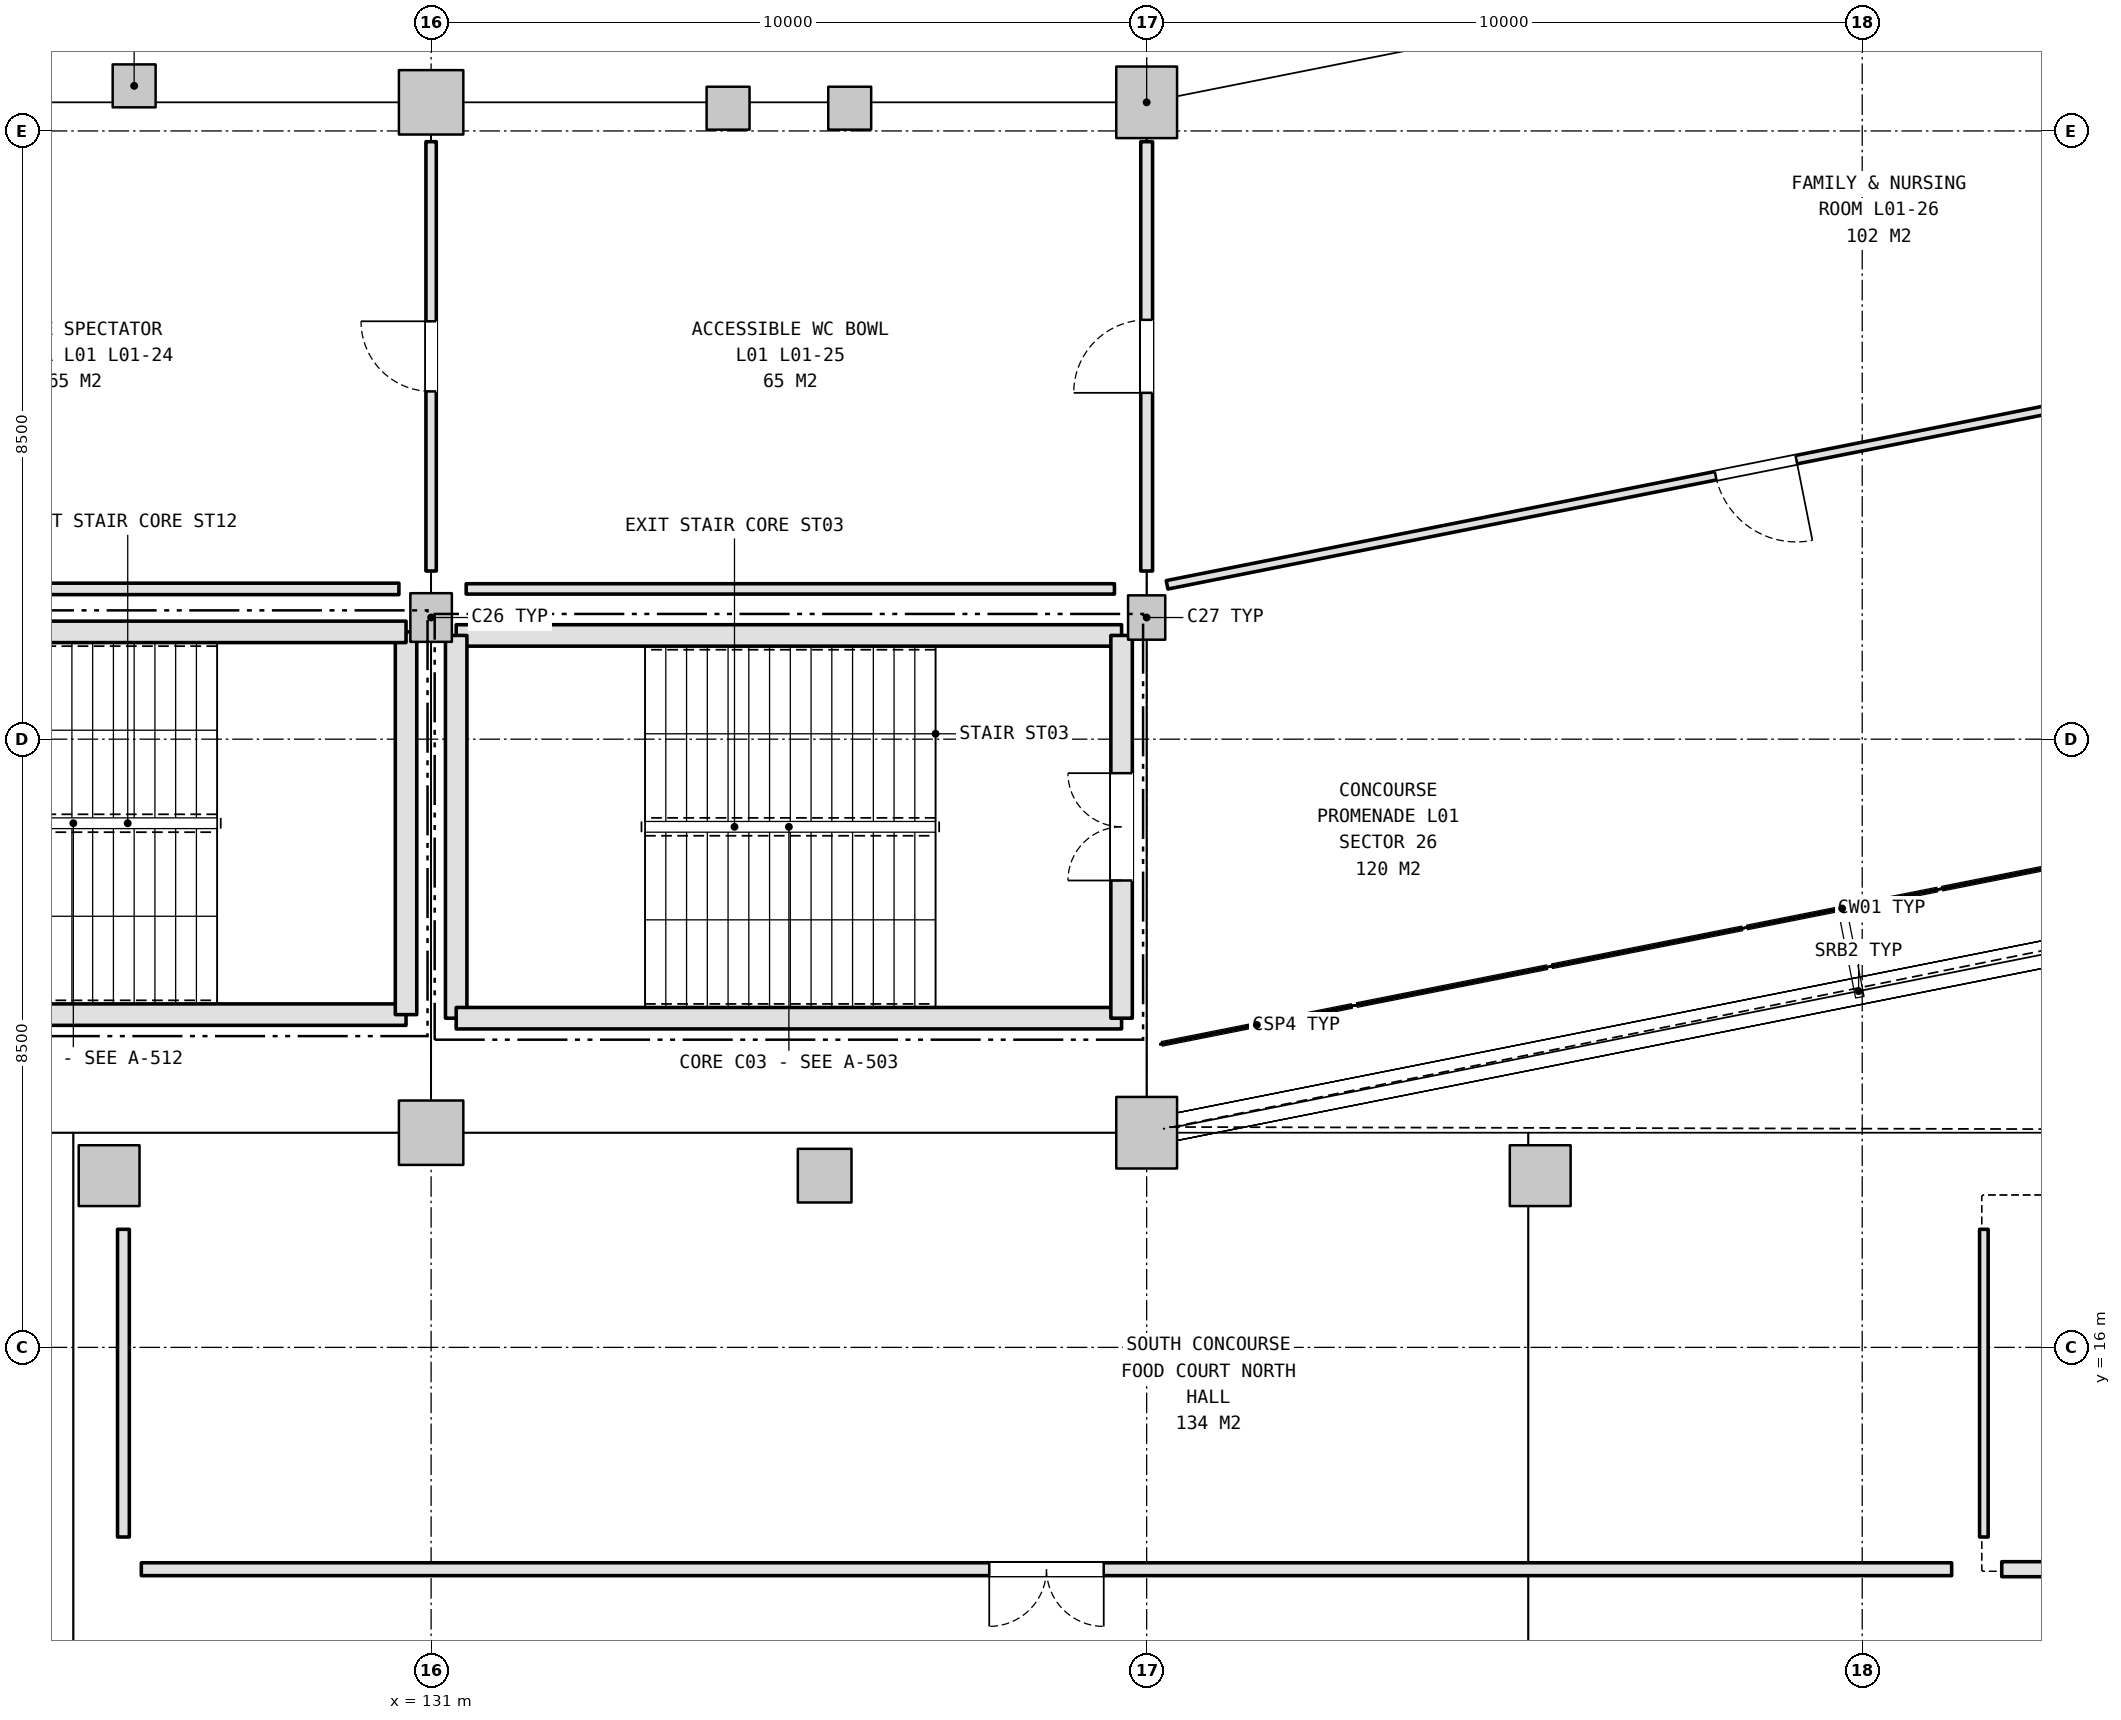
"""IFC4 building model, lengths in metres.
Left out: names, types, materials, properties, quantities, classifications, styles, units other than length and angle.
Written with IfcOpenShell. Run it as: python <this file> out.ifc"""

import sys

from ifc_helpers import new_model, si_unit, direction, frame, frame_2d, origin, origin_2d, place, context, subcontext, project, spatial, rectangle, extrude, element, fill, save


model = new_model("IFC4")
c1 = context("Model", 3, precision=1e-05, world=origin(), true_north=direction((0.0, 1.0)))
c2 = subcontext(c1, "Body", "Model", "MODEL_VIEW")
j1 = project(units=[si_unit("LENGTHUNIT", "METRE"), si_unit("PLANEANGLEUNIT", "RADIAN")], contexts=[c1])
p1 = place(None, origin())
s1 = spatial("IfcSite", under=j1, at=p1, CompositionType="ELEMENT")
p2 = place(p1, origin())
s2 = spatial("IfcBuilding", under=s1, at=p2, CompositionType="ELEMENT")
p3 = place(p2, frame((0.0, 0.0, 5.4)))
s3 = spatial("IfcBuildingStorey", under=s2, at=p3, CompositionType="ELEMENT", Elevation=5.4)
p4 = place(p3, frame((131.0, 33.4, 0.0), z_axis=(0.0, 0.0, 1.0), x_axis=(1.0, 0.0, 0.0)))
e1 = element("IfcColumn", 1, at=p4, inside=s3, PredefinedType="COLUMN", context=c2, shape_type="SweptSolid", body=[
    extrude(rectangle(XDim=0.9, YDim=0.9, at=origin_2d()), origin(), (0.0, 0.0, 1.0), 5.4),
])
p5 = place(p3, frame((131.0, 26.2, 0.0), z_axis=(0.0, 0.0, 1.0), x_axis=(1.0, 0.0, 0.0)))
e2 = element("IfcColumn", 2, at=p5, inside=s3, PredefinedType="COLUMN", context=c2, shape_type="SweptSolid", body=[
    extrude(rectangle(XDim=0.58, YDim=0.68, at=origin_2d()), origin(), (0.0, 0.0, 1.0), 5.4),
])
p6 = place(p3, frame((131.0, 19.0, 0.0), z_axis=(0.0, 0.0, 1.0), x_axis=(1.0, 0.0, 0.0)))
e3 = element("IfcColumn", 3, at=p6, inside=s3, PredefinedType="COLUMN", context=c2, shape_type="SweptSolid", body=[
    extrude(rectangle(XDim=0.9, YDim=0.9, at=origin_2d()), origin(), (0.0, 0.0, 1.0), 5.4),
])
p7 = place(p3, frame((141.0, 33.4, 0.0), z_axis=(0.0, 0.0, 1.0), x_axis=(1.0, 0.0, 0.0)))
e4 = element("IfcColumn", 4, at=p7, inside=s3, PredefinedType="COLUMN", context=c2, shape_type="SweptSolid", body=[
    extrude(rectangle(XDim=0.85, YDim=1.0, at=origin_2d()), origin(), (0.0, 0.0, 1.0), 5.4),
])
p8 = place(p3, frame((141.0, 26.2, 0.0), z_axis=(0.0, 0.0, 1.0), x_axis=(1.0, 0.0, 0.0)))
e5 = element("IfcColumn", 5, at=p8, inside=s3, PredefinedType="COLUMN", context=c2, shape_type="SweptSolid", body=[
    extrude(rectangle(XDim=0.52, YDim=0.62, at=origin_2d()), origin(), (0.0, 0.0, 1.0), 5.4),
])
p9 = place(p3, frame((141.0, 19.0, 0.0), z_axis=(0.0, 0.0, 1.0), x_axis=(1.0, 0.0, 0.0)))
e6 = element("IfcColumn", 6, at=p9, inside=s3, PredefinedType="COLUMN", context=c2, shape_type="SweptSolid", body=[
    extrude(rectangle(XDim=0.85, YDim=1.0, at=origin_2d()), origin(), (0.0, 0.0, 1.0), 5.4),
])
p10 = place(p3, frame((126.5, 18.4, 0.0), z_axis=(0.0, 0.0, 1.0), x_axis=(1.0, 0.0, 0.0)))
e7 = element("IfcColumn", 7, at=p10, inside=s3, PredefinedType="COLUMN", context=c2, shape_type="SweptSolid", body=[
    extrude(rectangle(XDim=0.85, YDim=0.85, at=origin_2d()), origin(), (0.0, 0.0, 1.0), 5.4),
])
p11 = place(p3, frame((136.5, 18.4, 0.0), z_axis=(0.0, 0.0, 1.0), x_axis=(1.0, 0.0, 0.0)))
e8 = element("IfcColumn", 8, at=p11, inside=s3, PredefinedType="COLUMN", context=c2, shape_type="SweptSolid", body=[
    extrude(rectangle(XDim=0.75, YDim=0.75, at=origin_2d()), origin(), (0.0, 0.0, 1.0), 5.4),
])
p12 = place(p3, frame((146.5, 18.4, 0.0), z_axis=(0.0, 0.0, 1.0), x_axis=(1.0, 0.0, 0.0)))
e9 = element("IfcColumn", 9, at=p12, inside=s3, PredefinedType="COLUMN", context=c2, shape_type="SweptSolid", body=[
    extrude(rectangle(XDim=0.85, YDim=0.85, at=origin_2d()), origin(), (0.0, 0.0, 1.0), 5.4),
])
p13 = place(p3, frame((140.65, 25.95, 0.0), z_axis=(0.0, 0.0, 1.0), x_axis=(-1.0, 0.0, 0.0)))
e10 = element("IfcWall", 10, at=p13, inside=s3, PredefinedType="SHEAR", context=c2, shape_type="SweptSolid", body=[
    extrude(rectangle(XDim=9.299, YDim=0.3, at=frame_2d((4.65, 0.0))), origin(), (0.0, 0.0, 1.0), 5.14),
])
p14 = place(p3, frame((131.35, 25.95, 0.0), z_axis=(0.0, 0.0, 1.0), x_axis=(0.0, -1.0, 0.0)))
e11 = element("IfcWall", 11, at=p14, inside=s3, PredefinedType="SHEAR", context=c2, shape_type="SweptSolid", body=[
    extrude(rectangle(XDim=5.349, YDim=0.3, at=frame_2d((2.675, 0.0))), origin(), (0.0, 0.0, 1.0), 5.14),
])
p15 = place(p3, frame((131.35, 20.6, 0.0), z_axis=(0.0, 0.0, 1.0), x_axis=(1.0, 0.0, 0.0)))
e12 = element("IfcWall", 12, at=p15, inside=s3, PredefinedType="SHEAR", context=c2, shape_type="SweptSolid", body=[
    extrude(rectangle(XDim=9.299, YDim=0.3, at=frame_2d((4.65, 0.0))), origin(), (0.0, 0.0, 1.0), 5.14),
])
p16 = place(p3, frame((140.65, 20.6, 0.0), z_axis=(0.0, 0.0, 1.0), x_axis=(0.0, 1.0, 0.0)))
e13 = element("IfcWall", 13, at=p16, inside=s3, PredefinedType="SHEAR", context=c2, shape_type="SweptSolid", body=[
    extrude(rectangle(XDim=5.349, YDim=0.3, at=frame_2d((2.675, 0.0))), origin(), (0.0, 0.0, 1.0), 5.14),
])
p17 = place(p16, frame((1.925, 0.0, 0.0)))
e14 = element("IfcOpeningElement", 14, at=p17, cuts=e13, PredefinedType="OPENING", context=c2, shape_type="SweptSolid", body=[
    extrude(rectangle(XDim=1.5, YDim=2.2, at=frame_2d((0.75, 1.1))), frame((0.0, 0.16, 0.0), z_axis=(0.0, -1.0, 0.0), x_axis=(1.0, 0.0, 0.0)), (0.0, 0.0, 1.0), 0.32),
])
p18 = place(p3, frame((121.35, 20.65, 0.0), z_axis=(0.0, 0.0, 1.0), x_axis=(1.0, 0.0, 0.0)))
e15 = element("IfcWall", 15, at=p18, inside=s3, PredefinedType="SHEAR", context=c2, shape_type="SweptSolid", body=[
    extrude(rectangle(XDim=9.299, YDim=0.3, at=frame_2d((4.65, 0.0))), origin(), (0.0, 0.0, 1.0), 5.14),
])
p19 = place(p3, frame((130.65, 20.65, 0.0), z_axis=(0.0, 0.0, 1.0), x_axis=(0.0, 1.0, 0.0)))
e16 = element("IfcWall", 16, at=p19, inside=s3, PredefinedType="SHEAR", context=c2, shape_type="SweptSolid", body=[
    extrude(rectangle(XDim=5.349, YDim=0.3, at=frame_2d((2.675, 0.0))), origin(), (0.0, 0.0, 1.0), 5.14),
])
p20 = place(p3, frame((130.65, 26.0, 0.0), z_axis=(0.0, 0.0, 1.0), x_axis=(-1.0, 0.0, 0.0)))
e17 = element("IfcWall", 17, at=p20, inside=s3, PredefinedType="SHEAR", context=c2, shape_type="SweptSolid", body=[
    extrude(rectangle(XDim=9.299, YDim=0.3, at=frame_2d((4.65, 0.0))), origin(), (0.0, 0.0, 1.0), 5.14),
])
for number, where, z_axis, x_axis in (
    (18, (126.85, 33.63, 0.0), (0.0, 0.0, 1.0), (1.0, 0.0, 0.0)),
    (19, (136.85, 33.318, 0.0), (0.0, 0.0, 1.0), (1.0, 0.0, 0.0)),
    (20, (135.15, 33.318, 0.0), (0.0, 0.0, 1.0), (1.0, 0.0, 0.0)),
):
    element("IfcColumn", number, at=place(p3, frame(where, z_axis=z_axis, x_axis=x_axis)), inside=s3, PredefinedType="COLUMN", context=c2, shape_type="SweptSolid", body=[
        extrude(rectangle(XDim=0.6, YDim=0.6, at=origin_2d()), origin(), (0.0, 0.0, 1.0), 5.4),
    ])
p21 = place(p3, frame((152.25, 12.9, 0.0), z_axis=(0.0, 0.0, 1.0), x_axis=(-1.0, 0.0, 0.0)))
e21 = element("IfcWall", 21, at=p21, inside=s3, PredefinedType="PARTITIONING", context=c2, shape_type="SweptSolid", body=[
    extrude(rectangle(XDim=25.3, YDim=0.18, at=frame_2d((12.65, 0.0))), origin(), (0.0, 0.0, 1.0), 4.425),
])
p22 = place(p21, frame((11.85, 0.0, 0.0)))
e22 = element("IfcOpeningElement", 22, at=p22, cuts=e21, PredefinedType="OPENING", context=c2, shape_type="SweptSolid", body=[
    extrude(rectangle(XDim=1.6, YDim=2.2, at=frame_2d((0.8, 1.1))), frame((0.0, 0.1, 0.0), z_axis=(0.0, -1.0, 0.0), x_axis=(1.0, 0.0, 0.0)), (0.0, 0.0, 1.0), 0.2),
])
p23 = place(p3, frame((126.7, 13.35, 0.0), z_axis=(0.0, 0.0, 1.0), x_axis=(0.0, 1.0, 0.0)))
e23 = element("IfcWall", 23, at=p23, inside=s3, PredefinedType="PARTITIONING", context=c2, shape_type="SweptSolid", body=[
    extrude(rectangle(XDim=4.3, YDim=0.165, at=frame_2d((2.15, 0.0))), origin(), (0.0, 0.0, 1.0), 4.475),
])
p24 = place(p3, frame((170.25, 12.9, 0.0), z_axis=(0.0, 0.0, 1.0), x_axis=(-1.0, 0.0, 0.0)))
e24 = element("IfcWall", 24, at=p24, inside=s3, PredefinedType="PLUMBINGWALL", context=c2, shape_type="SweptSolid", body=[
    extrude(rectangle(XDim=17.3, YDim=0.21, at=frame_2d((8.65, 0.0))), origin(), (0.0, 0.0, 1.0), 4.425),
])
p25 = place(p24, frame((8.125, 0.0, 0.0)))
e25 = element("IfcOpeningElement", 25, at=p25, cuts=e24, PredefinedType="OPENING", context=c2, shape_type="SweptSolid", body=[
    extrude(rectangle(XDim=1.05, YDim=2.2, at=frame_2d((0.525, 1.1))), frame((0.0, 0.115, 0.0), z_axis=(0.0, -1.0, 0.0), x_axis=(1.0, 0.0, 0.0)), (0.0, 0.0, 1.0), 0.23),
])
p26 = place(p3, frame((152.7, 13.35, 0.0), z_axis=(0.0, 0.0, 1.0), x_axis=(0.0, 1.0, 0.0)))
e26 = element("IfcWall", 26, at=p26, inside=s3, PredefinedType="PARTITIONING", context=c2, shape_type="SweptSolid", body=[
    extrude(rectangle(XDim=4.3, YDim=0.12, at=frame_2d((2.15, 0.0))), origin(), (0.0, 0.0, 1.0), 4.625),
])
p27 = place(p3, frame((131.0, 32.85, 0.0), z_axis=(0.0, 0.0, 1.0), x_axis=(0.0, -1.0, 0.0)))
e27 = element("IfcWall", 27, at=p27, inside=s3, PredefinedType="PARTITIONING", context=c2, shape_type="SweptSolid", body=[
    extrude(rectangle(XDim=6.0, YDim=0.145, at=frame_2d((3.0, 0.0))), origin(), (0.0, 0.0, 1.0), 4.385),
])
p28 = place(p27, frame((2.51, 0.0, 0.0)))
e28 = element("IfcOpeningElement", 28, at=p28, cuts=e27, PredefinedType="OPENING", context=c2, shape_type="SweptSolid", body=[
    extrude(rectangle(XDim=0.98, YDim=2.15, at=frame_2d((0.49, 1.075))), frame((0.0, 0.083, 0.0), z_axis=(0.0, -1.0, 0.0), x_axis=(1.0, 0.0, 0.0)), (0.0, 0.0, 1.0), 0.165),
])
p29 = place(p3, frame((130.55, 26.6, 0.0), z_axis=(0.0, 0.0, 1.0), x_axis=(-1.0, 0.0, 0.0)))
e29 = element("IfcWall", 29, at=p29, inside=s3, PredefinedType="PARTITIONING", context=c2, shape_type="SweptSolid", body=[
    extrude(rectangle(XDim=9.06, YDim=0.16, at=frame_2d((4.53, 0.0))), origin(), (0.0, 0.0, 1.0), 5.12),
])
p30 = place(p3, frame((141.0, 32.85, 0.0), z_axis=(0.0, 0.0, 1.0), x_axis=(0.0, -1.0, 0.0)))
e30 = element("IfcWall", 30, at=p30, inside=s3, PredefinedType="PARTITIONING", context=c2, shape_type="SweptSolid", body=[
    extrude(rectangle(XDim=6.0, YDim=0.165, at=frame_2d((3.0, 0.0))), origin(), (0.0, 0.0, 1.0), 4.305),
])
p31 = place(p30, frame((2.49, 0.0, 0.0)))
e31 = element("IfcOpeningElement", 31, at=p31, cuts=e30, PredefinedType="OPENING", context=c2, shape_type="SweptSolid", body=[
    extrude(rectangle(XDim=1.02, YDim=2.15, at=frame_2d((0.51, 1.075))), frame((0.0, 0.093, 0.0), z_axis=(0.0, -1.0, 0.0), x_axis=(1.0, 0.0, 0.0)), (0.0, 0.0, 1.0), 0.185),
])
p32 = place(p3, frame((140.55, 26.6, 0.0), z_axis=(0.0, 0.0, 1.0), x_axis=(-1.0, 0.0, 0.0)))
e32 = element("IfcWall", 32, at=p32, inside=s3, PredefinedType="PARTITIONING", context=c2, shape_type="SweptSolid", body=[
    extrude(rectangle(XDim=9.06, YDim=0.145, at=frame_2d((4.53, 0.0))), origin(), (0.0, 0.0, 1.0), 5.12),
])
p33 = place(p3, frame((157.746, 29.931, 0.0), z_axis=(0.0, 0.0, 1.0), x_axis=(-0.980786027867, -0.195086564225, 0.0)))
e33 = element("IfcWall", 33, at=p33, inside=s3, PredefinedType="PARTITIONING", context=c2, shape_type="SweptSolid", body=[
    extrude(rectangle(XDim=16.783, YDim=0.12, at=frame_2d((8.392, 0.0))), origin(), (0.0, 0.0, 1.0), 4.305),
])
p34 = place(p33, frame((7.817, 0.0, 0.0)))
e34 = element("IfcOpeningElement", 34, at=p34, cuts=e33, PredefinedType="OPENING", context=c2, shape_type="SweptSolid", body=[
    extrude(rectangle(XDim=1.15, YDim=2.2, at=frame_2d((0.575, 1.1))), frame((0.0, 0.07, 0.0), z_axis=(0.0, -1.0, 0.0), x_axis=(1.0, 0.0, 0.0)), (0.0, 0.0, 1.0), 0.14),
])
p35 = place(p17, origin())
e35 = element("IfcDoor", 35, at=p35, inside=s3, OperationType="DOUBLE_DOOR_SINGLE_SWING", PredefinedType="DOOR", context=c2, shape_type="SweptSolid", body=[
    extrude(rectangle(XDim=1.5, YDim=2.2, at=frame_2d((0.75, 1.1))), frame((0.0, 0.025, 0.0), z_axis=(0.0, -1.0, 0.0), x_axis=(1.0, 0.0, 0.0)), (0.0, 0.0, 1.0), 0.05),
])
fill(e14, e35)
p36 = place(p22, origin())
e36 = element("IfcDoor", 36, at=p36, inside=s3, OperationType="DOUBLE_DOOR_SINGLE_SWING", PredefinedType="DOOR", context=c2, shape_type="SweptSolid", body=[
    extrude(rectangle(XDim=1.6, YDim=2.2, at=frame_2d((0.8, 1.1))), frame((0.0, 0.025, 0.0), z_axis=(0.0, -1.0, 0.0), x_axis=(1.0, 0.0, 0.0)), (0.0, 0.0, 1.0), 0.05),
])
fill(e22, e36)
p37 = place(p28, frame((0.98, 0.0, 0.0), z_axis=(0.0, 0.0, 1.0), x_axis=(-1.0, 0.0, 0.0)))
e37 = element("IfcDoor", 37, at=p37, inside=s3, OperationType="SINGLE_SWING_LEFT", PredefinedType="DOOR", context=c2, shape_type="SweptSolid", body=[
    extrude(rectangle(XDim=0.98, YDim=2.15, at=frame_2d((0.49, 1.075))), frame((0.0, 0.025, 0.0), z_axis=(0.0, -1.0, 0.0), x_axis=(1.0, 0.0, 0.0)), (0.0, 0.0, 1.0), 0.05),
])
fill(e28, e37)
p38 = place(p31, frame((1.02, 0.0, 0.0), z_axis=(0.0, 0.0, 1.0), x_axis=(-1.0, 0.0, 0.0)))
e38 = element("IfcDoor", 38, at=p38, inside=s3, OperationType="SINGLE_SWING_RIGHT", PredefinedType="DOOR", context=c2, shape_type="SweptSolid", body=[
    extrude(rectangle(XDim=1.02, YDim=2.15, at=frame_2d((0.51, 1.075))), frame((0.0, 0.025, 0.0), z_axis=(0.0, -1.0, 0.0), x_axis=(1.0, 0.0, 0.0)), (0.0, 0.0, 1.0), 0.05),
])
fill(e31, e38)
p39 = place(p34, origin())
e39 = element("IfcDoor", 39, at=p39, inside=s3, OperationType="SINGLE_SWING_LEFT", PredefinedType="DOOR", context=c2, shape_type="SweptSolid", body=[
    extrude(rectangle(XDim=1.15, YDim=2.2, at=frame_2d((0.575, 1.1))), frame((0.0, 0.025, 0.0), z_axis=(0.0, -1.0, 0.0), x_axis=(1.0, 0.0, 0.0)), (0.0, 0.0, 1.0), 0.05),
])
fill(e34, e39)
save(model, sys.argv[1])
